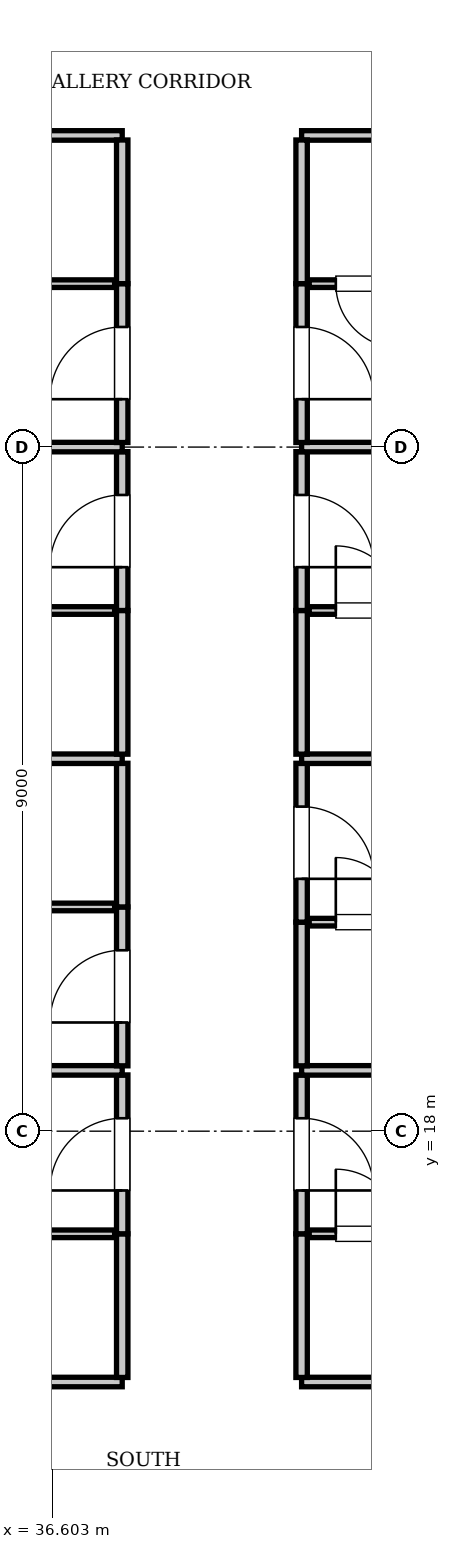
"""IFC4 building model, lengths in metres.
Left out: names, types, materials, properties, quantities, classifications, styles, units other than length and angle.
Written with IfcOpenShell. Run it as: python <this file> out.ifc"""

import sys

from ifc_helpers import new_model, si_unit, direction, frame, frame_2d, origin, place, context, subcontext, project, spatial, rectangle, extrude, element, fill, save


model = new_model("IFC4")
c1 = context("Model", 3, precision=1e-05, world=origin(), true_north=direction((0.0, 1.0)))
c2 = subcontext(c1, "Body", "Model", "MODEL_VIEW")
j1 = project(units=[si_unit("LENGTHUNIT", "METRE"), si_unit("PLANEANGLEUNIT", "RADIAN")], contexts=[c1])
p1 = place(None, origin())
s1 = spatial("IfcSite", under=j1, at=p1, CompositionType="ELEMENT")
p2 = place(p1, origin())
s2 = spatial("IfcBuilding", under=s1, at=p2, CompositionType="ELEMENT")
p3 = place(p2, frame((0.0, 0.0, 177.45)))
s3 = spatial("IfcBuildingStorey", under=s2, at=p3, CompositionType="ELEMENT", Elevation=177.45)
p4 = place(p3, frame((13.2, 14.7, 0.0), z_axis=(0.0, 0.0, 1.0), x_axis=(1.0, 0.0, 0.0)))
e1 = element("IfcWall", 1, at=p4, inside=s3, PredefinedType="PARTITIONING", context=c2, shape_type="SweptSolid", body=[
    extrude(rectangle(XDim=24.32, YDim=0.125, at=frame_2d((12.16, 0.0))), origin(), (0.0, 0.0, 1.0), 3.61),
])
p5 = place(p3, frame((39.88, 14.7, 0.0), z_axis=(0.0, 0.0, 1.0), x_axis=(1.0, 0.0, 0.0)))
e2 = element("IfcWall", 2, at=p5, inside=s3, PredefinedType="PARTITIONING", context=c2, shape_type="SweptSolid", body=[
    extrude(rectangle(XDim=22.52, YDim=0.125, at=frame_2d((11.26, 0.0))), origin(), (0.0, 0.0, 1.0), 3.61),
])
p6 = place(p3, frame((13.2, 31.1, 0.0), z_axis=(0.0, 0.0, 1.0), x_axis=(1.0, 0.0, 0.0)))
e3 = element("IfcWall", 3, at=p6, inside=s3, PredefinedType="PARTITIONING", context=c2, shape_type="SweptSolid", body=[
    extrude(rectangle(XDim=24.32, YDim=0.125, at=frame_2d((12.16, 0.0))), origin(), (0.0, 0.0, 1.0), 3.61),
])
p7 = place(p3, frame((39.88, 31.1, 0.0), z_axis=(0.0, 0.0, 1.0), x_axis=(1.0, 0.0, 0.0)))
e4 = element("IfcWall", 4, at=p7, inside=s3, PredefinedType="PARTITIONING", context=c2, shape_type="SweptSolid", body=[
    extrude(rectangle(XDim=22.52, YDim=0.125, at=frame_2d((11.26, 0.0))), origin(), (0.0, 0.0, 1.0), 3.61),
])
p8 = place(p3, frame((37.52, 14.76, 0.0), z_axis=(0.0, 0.0, 1.0), x_axis=(0.0, 1.0, 0.0)))
e5 = element("IfcWall", 5, at=p8, inside=s3, PredefinedType="PARTITIONING", context=c2, shape_type="SweptSolid", body=[
    extrude(rectangle(XDim=1.89, YDim=0.15, at=frame_2d((0.945, 0.0))), origin(), (0.0, 0.0, 1.0), 3.61),
])
p9 = place(p3, frame((37.52, 16.65, 0.0), z_axis=(0.0, 0.0, 1.0), x_axis=(0.0, 1.0, 0.0)))
e6 = element("IfcWall", 6, at=p9, inside=s3, PredefinedType="PARTITIONING", context=c2, shape_type="SweptSolid", body=[
    extrude(rectangle(XDim=2.09, YDim=0.15, at=frame_2d((1.045, 0.0))), origin(), (0.0, 0.0, 1.0), 3.61),
])
p10 = place(p9, frame((0.57, 0.0, 0.0)))
e7 = element("IfcOpeningElement", 7, at=p10, cuts=e6, PredefinedType="OPENING", context=c2, shape_type="SweptSolid", body=[
    extrude(rectangle(XDim=0.95, YDim=2.15, at=frame_2d((0.475, 1.075))), frame((0.0, 0.085, 0.0), z_axis=(0.0, -1.0, 0.0), x_axis=(1.0, 0.0, 0.0)), (0.0, 0.0, 1.0), 0.17),
])
p11 = place(p3, frame((35.12, 16.65, 0.0), z_axis=(0.0, 0.0, 1.0), x_axis=(1.0, 0.0, 0.0)))
e8 = element("IfcWall", 8, at=p11, inside=s3, PredefinedType="PARTITIONING", context=c2, shape_type="SweptSolid", body=[
    extrude(rectangle(XDim=2.3, YDim=0.1, at=frame_2d((1.15, 0.0))), origin(), (0.0, 0.0, 1.0), 3.61),
])
p12 = place(p11, frame((0.35, 0.0, 0.0)))
e9 = element("IfcOpeningElement", 9, at=p12, cuts=e8, PredefinedType="OPENING", context=c2, shape_type="SweptSolid", body=[
    extrude(rectangle(XDim=0.85, YDim=2.1, at=frame_2d((0.425, 1.05))), frame((0.0, 0.06, 0.0), z_axis=(0.0, -1.0, 0.0), x_axis=(1.0, 0.0, 0.0)), (0.0, 0.0, 1.0), 0.12),
])
p13 = place(p3, frame((39.88, 14.76, 0.0), z_axis=(0.0, 0.0, 1.0), x_axis=(0.0, 1.0, 0.0)))
e10 = element("IfcWall", 10, at=p13, inside=s3, PredefinedType="PARTITIONING", context=c2, shape_type="SweptSolid", body=[
    extrude(rectangle(XDim=1.89, YDim=0.15, at=frame_2d((0.945, 0.0))), origin(), (0.0, 0.0, 1.0), 3.61),
])
p14 = place(p3, frame((39.88, 16.65, 0.0), z_axis=(0.0, 0.0, 1.0), x_axis=(0.0, 1.0, 0.0)))
e11 = element("IfcWall", 11, at=p14, inside=s3, PredefinedType="PARTITIONING", context=c2, shape_type="SweptSolid", body=[
    extrude(rectangle(XDim=2.09, YDim=0.15, at=frame_2d((1.045, 0.0))), origin(), (0.0, 0.0, 1.0), 3.61),
])
p15 = place(p14, frame((0.57, 0.0, 0.0)))
e12 = element("IfcOpeningElement", 12, at=p15, cuts=e11, PredefinedType="OPENING", context=c2, shape_type="SweptSolid", body=[
    extrude(rectangle(XDim=0.95, YDim=2.15, at=frame_2d((0.475, 1.075))), frame((0.0, 0.085, 0.0), z_axis=(0.0, -1.0, 0.0), x_axis=(1.0, 0.0, 0.0)), (0.0, 0.0, 1.0), 0.17),
])
p16 = place(p3, frame((39.98, 16.65, 0.0), z_axis=(0.0, 0.0, 1.0), x_axis=(1.0, 0.0, 0.0)))
e13 = element("IfcWall", 13, at=p16, inside=s3, PredefinedType="PARTITIONING", context=c2, shape_type="SweptSolid", body=[
    extrude(rectangle(XDim=2.3, YDim=0.1, at=frame_2d((1.15, 0.0))), origin(), (0.0, 0.0, 1.0), 3.61),
])
p17 = place(p16, frame((0.35, 0.0, 0.0)))
e14 = element("IfcOpeningElement", 14, at=p17, cuts=e13, PredefinedType="OPENING", context=c2, shape_type="SweptSolid", body=[
    extrude(rectangle(XDim=0.85, YDim=2.1, at=frame_2d((0.425, 1.05))), frame((0.0, 0.06, 0.0), z_axis=(0.0, -1.0, 0.0), x_axis=(1.0, 0.0, 0.0)), (0.0, 0.0, 1.0), 0.12),
])
p18 = place(p3, frame((13.2, 18.8, 0.0), z_axis=(0.0, 0.0, 1.0), x_axis=(1.0, 0.0, 0.0)))
e15 = element("IfcWall", 15, at=p18, inside=s3, PredefinedType="PARTITIONING", context=c2, shape_type="SweptSolid", body=[
    extrude(rectangle(XDim=24.32, YDim=0.125, at=frame_2d((12.16, 0.0))), origin(), (0.0, 0.0, 1.0), 3.61),
])
p19 = place(p3, frame((39.88, 18.8, 0.0), z_axis=(0.0, 0.0, 1.0), x_axis=(1.0, 0.0, 0.0)))
e16 = element("IfcWall", 16, at=p19, inside=s3, PredefinedType="PARTITIONING", context=c2, shape_type="SweptSolid", body=[
    extrude(rectangle(XDim=22.52, YDim=0.125, at=frame_2d((11.26, 0.0))), origin(), (0.0, 0.0, 1.0), 3.61),
])
p20 = place(p3, frame((37.52, 18.86, 0.0), z_axis=(0.0, 0.0, 1.0), x_axis=(0.0, 1.0, 0.0)))
e17 = element("IfcWall", 17, at=p20, inside=s3, PredefinedType="PARTITIONING", context=c2, shape_type="SweptSolid", body=[
    extrude(rectangle(XDim=2.09, YDim=0.15, at=frame_2d((1.045, 0.0))), origin(), (0.0, 0.0, 1.0), 3.61),
])
p21 = place(p20, frame((0.57, 0.0, 0.0)))
e18 = element("IfcOpeningElement", 18, at=p21, cuts=e17, PredefinedType="OPENING", context=c2, shape_type="SweptSolid", body=[
    extrude(rectangle(XDim=0.95, YDim=2.15, at=frame_2d((0.475, 1.075))), frame((0.0, 0.085, 0.0), z_axis=(0.0, -1.0, 0.0), x_axis=(1.0, 0.0, 0.0)), (0.0, 0.0, 1.0), 0.17),
])
p22 = place(p3, frame((37.52, 20.95, 0.0), z_axis=(0.0, 0.0, 1.0), x_axis=(0.0, 1.0, 0.0)))
e19 = element("IfcWall", 19, at=p22, inside=s3, PredefinedType="PARTITIONING", context=c2, shape_type="SweptSolid", body=[
    extrude(rectangle(XDim=1.89, YDim=0.15, at=frame_2d((0.945, 0.0))), origin(), (0.0, 0.0, 1.0), 3.61),
])
p23 = place(p3, frame((35.12, 20.95, 0.0), z_axis=(0.0, 0.0, 1.0), x_axis=(1.0, 0.0, 0.0)))
e20 = element("IfcWall", 20, at=p23, inside=s3, PredefinedType="PARTITIONING", context=c2, shape_type="SweptSolid", body=[
    extrude(rectangle(XDim=2.3, YDim=0.1, at=frame_2d((1.15, 0.0))), origin(), (0.0, 0.0, 1.0), 3.61),
])
p24 = place(p23, frame((0.35, 0.0, 0.0)))
e21 = element("IfcOpeningElement", 21, at=p24, cuts=e20, PredefinedType="OPENING", context=c2, shape_type="SweptSolid", body=[
    extrude(rectangle(XDim=0.85, YDim=2.1, at=frame_2d((0.425, 1.05))), frame((0.0, 0.06, 0.0), z_axis=(0.0, -1.0, 0.0), x_axis=(1.0, 0.0, 0.0)), (0.0, 0.0, 1.0), 0.12),
])
p25 = place(p3, frame((39.88, 18.86, 0.0), z_axis=(0.0, 0.0, 1.0), x_axis=(0.0, 1.0, 0.0)))
e22 = element("IfcWall", 22, at=p25, inside=s3, PredefinedType="PARTITIONING", context=c2, shape_type="SweptSolid", body=[
    extrude(rectangle(XDim=1.89, YDim=0.15, at=frame_2d((0.945, 0.0))), origin(), (0.0, 0.0, 1.0), 3.61),
])
p26 = place(p3, frame((39.88, 20.75, 0.0), z_axis=(0.0, 0.0, 1.0), x_axis=(0.0, 1.0, 0.0)))
e23 = element("IfcWall", 23, at=p26, inside=s3, PredefinedType="PARTITIONING", context=c2, shape_type="SweptSolid", body=[
    extrude(rectangle(XDim=2.09, YDim=0.15, at=frame_2d((1.045, 0.0))), origin(), (0.0, 0.0, 1.0), 3.61),
])
p27 = place(p26, frame((0.57, 0.0, 0.0)))
e24 = element("IfcOpeningElement", 24, at=p27, cuts=e23, PredefinedType="OPENING", context=c2, shape_type="SweptSolid", body=[
    extrude(rectangle(XDim=0.95, YDim=2.15, at=frame_2d((0.475, 1.075))), frame((0.0, 0.085, 0.0), z_axis=(0.0, -1.0, 0.0), x_axis=(1.0, 0.0, 0.0)), (0.0, 0.0, 1.0), 0.17),
])
p28 = place(p3, frame((39.98, 20.75, 0.0), z_axis=(0.0, 0.0, 1.0), x_axis=(1.0, 0.0, 0.0)))
e25 = element("IfcWall", 25, at=p28, inside=s3, PredefinedType="PARTITIONING", context=c2, shape_type="SweptSolid", body=[
    extrude(rectangle(XDim=2.3, YDim=0.1, at=frame_2d((1.15, 0.0))), origin(), (0.0, 0.0, 1.0), 3.61),
])
p29 = place(p28, frame((0.35, 0.0, 0.0)))
e26 = element("IfcOpeningElement", 26, at=p29, cuts=e25, PredefinedType="OPENING", context=c2, shape_type="SweptSolid", body=[
    extrude(rectangle(XDim=0.85, YDim=2.1, at=frame_2d((0.425, 1.05))), frame((0.0, 0.06, 0.0), z_axis=(0.0, -1.0, 0.0), x_axis=(1.0, 0.0, 0.0)), (0.0, 0.0, 1.0), 0.12),
])
p30 = place(p3, frame((13.2, 22.9, 0.0), z_axis=(0.0, 0.0, 1.0), x_axis=(1.0, 0.0, 0.0)))
e27 = element("IfcWall", 27, at=p30, inside=s3, PredefinedType="PARTITIONING", context=c2, shape_type="SweptSolid", body=[
    extrude(rectangle(XDim=24.32, YDim=0.125, at=frame_2d((12.16, 0.0))), origin(), (0.0, 0.0, 1.0), 3.61),
])
p31 = place(p3, frame((39.88, 22.9, 0.0), z_axis=(0.0, 0.0, 1.0), x_axis=(1.0, 0.0, 0.0)))
e28 = element("IfcWall", 28, at=p31, inside=s3, PredefinedType="PARTITIONING", context=c2, shape_type="SweptSolid", body=[
    extrude(rectangle(XDim=22.52, YDim=0.125, at=frame_2d((11.26, 0.0))), origin(), (0.0, 0.0, 1.0), 3.61),
])
p32 = place(p3, frame((37.52, 22.96, 0.0), z_axis=(0.0, 0.0, 1.0), x_axis=(0.0, 1.0, 0.0)))
e29 = element("IfcWall", 29, at=p32, inside=s3, PredefinedType="PARTITIONING", context=c2, shape_type="SweptSolid", body=[
    extrude(rectangle(XDim=1.89, YDim=0.15, at=frame_2d((0.945, 0.0))), origin(), (0.0, 0.0, 1.0), 3.61),
])
p33 = place(p3, frame((37.52, 24.85, 0.0), z_axis=(0.0, 0.0, 1.0), x_axis=(0.0, 1.0, 0.0)))
e30 = element("IfcWall", 30, at=p33, inside=s3, PredefinedType="PARTITIONING", context=c2, shape_type="SweptSolid", body=[
    extrude(rectangle(XDim=2.09, YDim=0.15, at=frame_2d((1.045, 0.0))), origin(), (0.0, 0.0, 1.0), 3.61),
])
p34 = place(p33, frame((0.57, 0.0, 0.0)))
e31 = element("IfcOpeningElement", 31, at=p34, cuts=e30, PredefinedType="OPENING", context=c2, shape_type="SweptSolid", body=[
    extrude(rectangle(XDim=0.95, YDim=2.15, at=frame_2d((0.475, 1.075))), frame((0.0, 0.085, 0.0), z_axis=(0.0, -1.0, 0.0), x_axis=(1.0, 0.0, 0.0)), (0.0, 0.0, 1.0), 0.17),
])
p35 = place(p3, frame((35.12, 24.85, 0.0), z_axis=(0.0, 0.0, 1.0), x_axis=(1.0, 0.0, 0.0)))
e32 = element("IfcWall", 32, at=p35, inside=s3, PredefinedType="PARTITIONING", context=c2, shape_type="SweptSolid", body=[
    extrude(rectangle(XDim=2.3, YDim=0.1, at=frame_2d((1.15, 0.0))), origin(), (0.0, 0.0, 1.0), 3.61),
])
p36 = place(p35, frame((0.35, 0.0, 0.0)))
e33 = element("IfcOpeningElement", 33, at=p36, cuts=e32, PredefinedType="OPENING", context=c2, shape_type="SweptSolid", body=[
    extrude(rectangle(XDim=0.85, YDim=2.1, at=frame_2d((0.425, 1.05))), frame((0.0, 0.06, 0.0), z_axis=(0.0, -1.0, 0.0), x_axis=(1.0, 0.0, 0.0)), (0.0, 0.0, 1.0), 0.12),
])
p37 = place(p3, frame((39.88, 22.96, 0.0), z_axis=(0.0, 0.0, 1.0), x_axis=(0.0, 1.0, 0.0)))
e34 = element("IfcWall", 34, at=p37, inside=s3, PredefinedType="PARTITIONING", context=c2, shape_type="SweptSolid", body=[
    extrude(rectangle(XDim=1.89, YDim=0.15, at=frame_2d((0.945, 0.0))), origin(), (0.0, 0.0, 1.0), 3.61),
])
p38 = place(p3, frame((39.88, 24.85, 0.0), z_axis=(0.0, 0.0, 1.0), x_axis=(0.0, 1.0, 0.0)))
e35 = element("IfcWall", 35, at=p38, inside=s3, PredefinedType="PARTITIONING", context=c2, shape_type="SweptSolid", body=[
    extrude(rectangle(XDim=2.09, YDim=0.15, at=frame_2d((1.045, 0.0))), origin(), (0.0, 0.0, 1.0), 3.61),
])
p39 = place(p38, frame((0.57, 0.0, 0.0)))
e36 = element("IfcOpeningElement", 36, at=p39, cuts=e35, PredefinedType="OPENING", context=c2, shape_type="SweptSolid", body=[
    extrude(rectangle(XDim=0.95, YDim=2.15, at=frame_2d((0.475, 1.075))), frame((0.0, 0.085, 0.0), z_axis=(0.0, -1.0, 0.0), x_axis=(1.0, 0.0, 0.0)), (0.0, 0.0, 1.0), 0.17),
])
p40 = place(p3, frame((39.98, 24.85, 0.0), z_axis=(0.0, 0.0, 1.0), x_axis=(1.0, 0.0, 0.0)))
e37 = element("IfcWall", 37, at=p40, inside=s3, PredefinedType="PARTITIONING", context=c2, shape_type="SweptSolid", body=[
    extrude(rectangle(XDim=2.3, YDim=0.1, at=frame_2d((1.15, 0.0))), origin(), (0.0, 0.0, 1.0), 3.61),
])
p41 = place(p40, frame((0.35, 0.0, 0.0)))
e38 = element("IfcOpeningElement", 38, at=p41, cuts=e37, PredefinedType="OPENING", context=c2, shape_type="SweptSolid", body=[
    extrude(rectangle(XDim=0.85, YDim=2.1, at=frame_2d((0.425, 1.05))), frame((0.0, 0.06, 0.0), z_axis=(0.0, -1.0, 0.0), x_axis=(1.0, 0.0, 0.0)), (0.0, 0.0, 1.0), 0.12),
])
p42 = place(p3, frame((13.2, 27.0, 0.0), z_axis=(0.0, 0.0, 1.0), x_axis=(1.0, 0.0, 0.0)))
e39 = element("IfcWall", 39, at=p42, inside=s3, PredefinedType="PARTITIONING", context=c2, shape_type="SweptSolid", body=[
    extrude(rectangle(XDim=24.32, YDim=0.125, at=frame_2d((12.16, 0.0))), origin(), (0.0, 0.0, 1.0), 2.41),
])
p43 = place(p3, frame((39.88, 27.0, 0.0), z_axis=(0.0, 0.0, 1.0), x_axis=(1.0, 0.0, 0.0)))
e40 = element("IfcWall", 40, at=p43, inside=s3, PredefinedType="PARTITIONING", context=c2, shape_type="SweptSolid", body=[
    extrude(rectangle(XDim=22.52, YDim=0.125, at=frame_2d((11.26, 0.0))), origin(), (0.0, 0.0, 1.0), 2.41),
])
p44 = place(p3, frame((37.52, 27.06, 0.0), z_axis=(0.0, 0.0, 1.0), x_axis=(0.0, 1.0, 0.0)))
e41 = element("IfcWall", 41, at=p44, inside=s3, PredefinedType="PARTITIONING", context=c2, shape_type="SweptSolid", body=[
    extrude(rectangle(XDim=2.09, YDim=0.15, at=frame_2d((1.045, 0.0))), origin(), (0.0, 0.0, 1.0), 3.61),
])
p45 = place(p44, frame((0.57, 0.0, 0.0)))
e42 = element("IfcOpeningElement", 42, at=p45, cuts=e41, PredefinedType="OPENING", context=c2, shape_type="SweptSolid", body=[
    extrude(rectangle(XDim=0.95, YDim=2.15, at=frame_2d((0.475, 1.075))), frame((0.0, 0.085, 0.0), z_axis=(0.0, -1.0, 0.0), x_axis=(1.0, 0.0, 0.0)), (0.0, 0.0, 1.0), 0.17),
])
p46 = place(p3, frame((37.52, 29.15, 0.0), z_axis=(0.0, 0.0, 1.0), x_axis=(0.0, 1.0, 0.0)))
e43 = element("IfcWall", 43, at=p46, inside=s3, PredefinedType="PARTITIONING", context=c2, shape_type="SweptSolid", body=[
    extrude(rectangle(XDim=1.89, YDim=0.15, at=frame_2d((0.945, 0.0))), origin(), (0.0, 0.0, 1.0), 3.61),
])
p47 = place(p3, frame((35.12, 29.15, 0.0), z_axis=(0.0, 0.0, 1.0), x_axis=(1.0, 0.0, 0.0)))
e44 = element("IfcWall", 44, at=p47, inside=s3, PredefinedType="PARTITIONING", context=c2, shape_type="SweptSolid", body=[
    extrude(rectangle(XDim=2.3, YDim=0.1, at=frame_2d((1.15, 0.0))), origin(), (0.0, 0.0, 1.0), 3.61),
])
p48 = place(p47, frame((0.35, 0.0, 0.0)))
e45 = element("IfcOpeningElement", 45, at=p48, cuts=e44, PredefinedType="OPENING", context=c2, shape_type="SweptSolid", body=[
    extrude(rectangle(XDim=0.85, YDim=2.1, at=frame_2d((0.425, 1.05))), frame((0.0, 0.06, 0.0), z_axis=(0.0, -1.0, 0.0), x_axis=(1.0, 0.0, 0.0)), (0.0, 0.0, 1.0), 0.12),
])
p49 = place(p3, frame((39.88, 27.06, 0.0), z_axis=(0.0, 0.0, 1.0), x_axis=(0.0, 1.0, 0.0)))
e46 = element("IfcWall", 46, at=p49, inside=s3, PredefinedType="PARTITIONING", context=c2, shape_type="SweptSolid", body=[
    extrude(rectangle(XDim=2.09, YDim=0.15, at=frame_2d((1.045, 0.0))), origin(), (0.0, 0.0, 1.0), 3.61),
])
p50 = place(p49, frame((0.57, 0.0, 0.0)))
e47 = element("IfcOpeningElement", 47, at=p50, cuts=e46, PredefinedType="OPENING", context=c2, shape_type="SweptSolid", body=[
    extrude(rectangle(XDim=0.95, YDim=2.15, at=frame_2d((0.475, 1.075))), frame((0.0, 0.085, 0.0), z_axis=(0.0, -1.0, 0.0), x_axis=(1.0, 0.0, 0.0)), (0.0, 0.0, 1.0), 0.17),
])
p51 = place(p3, frame((39.88, 29.15, 0.0), z_axis=(0.0, 0.0, 1.0), x_axis=(0.0, 1.0, 0.0)))
e48 = element("IfcWall", 48, at=p51, inside=s3, PredefinedType="PARTITIONING", context=c2, shape_type="SweptSolid", body=[
    extrude(rectangle(XDim=1.89, YDim=0.15, at=frame_2d((0.945, 0.0))), origin(), (0.0, 0.0, 1.0), 3.61),
])
p52 = place(p3, frame((39.98, 29.15, 0.0), z_axis=(0.0, 0.0, 1.0), x_axis=(1.0, 0.0, 0.0)))
e49 = element("IfcWall", 49, at=p52, inside=s3, PredefinedType="PARTITIONING", context=c2, shape_type="SweptSolid", body=[
    extrude(rectangle(XDim=2.3, YDim=0.1, at=frame_2d((1.15, 0.0))), origin(), (0.0, 0.0, 1.0), 3.61),
])
p53 = place(p52, frame((0.35, 0.0, 0.0)))
e50 = element("IfcOpeningElement", 50, at=p53, cuts=e49, PredefinedType="OPENING", context=c2, shape_type="SweptSolid", body=[
    extrude(rectangle(XDim=0.85, YDim=2.1, at=frame_2d((0.425, 1.05))), frame((0.0, 0.06, 0.0), z_axis=(0.0, -1.0, 0.0), x_axis=(1.0, 0.0, 0.0)), (0.0, 0.0, 1.0), 0.12),
])
p54 = place(p10, origin())
e51 = element("IfcDoor", 51, at=p54, inside=s3, OperationType="SINGLE_SWING_LEFT", PredefinedType="DOOR", context=c2, shape_type="SweptSolid", body=[
    extrude(rectangle(XDim=0.95, YDim=2.15, at=frame_2d((0.475, 1.075))), frame((0.0, 0.025, 0.0), z_axis=(0.0, -1.0, 0.0), x_axis=(1.0, 0.0, 0.0)), (0.0, 0.0, 1.0), 0.05),
])
fill(e7, e51)
p55 = place(p17, origin())
e52 = element("IfcDoor", 52, at=p55, inside=s3, OperationType="SINGLE_SWING_LEFT", PredefinedType="DOOR", context=c2, shape_type="SweptSolid", body=[
    extrude(rectangle(XDim=0.85, YDim=2.1, at=frame_2d((0.425, 1.05))), frame((0.0, 0.025, 0.0), z_axis=(0.0, -1.0, 0.0), x_axis=(1.0, 0.0, 0.0)), (0.0, 0.0, 1.0), 0.05),
])
fill(e14, e52)
p56 = place(p15, frame((0.95, 0.0, 0.0), z_axis=(0.0, 0.0, 1.0), x_axis=(-1.0, 0.0, 0.0)))
e53 = element("IfcDoor", 53, at=p56, inside=s3, OperationType="SINGLE_SWING_RIGHT", PredefinedType="DOOR", context=c2, shape_type="SweptSolid", body=[
    extrude(rectangle(XDim=0.95, YDim=2.15, at=frame_2d((0.475, 1.075))), frame((0.0, 0.025, 0.0), z_axis=(0.0, -1.0, 0.0), x_axis=(1.0, 0.0, 0.0)), (0.0, 0.0, 1.0), 0.05),
])
fill(e12, e53)
p57 = place(p21, origin())
e54 = element("IfcDoor", 54, at=p57, inside=s3, OperationType="SINGLE_SWING_LEFT", PredefinedType="DOOR", context=c2, shape_type="SweptSolid", body=[
    extrude(rectangle(XDim=0.95, YDim=2.15, at=frame_2d((0.475, 1.075))), frame((0.0, 0.025, 0.0), z_axis=(0.0, -1.0, 0.0), x_axis=(1.0, 0.0, 0.0)), (0.0, 0.0, 1.0), 0.05),
])
fill(e18, e54)
p58 = place(p29, origin())
e55 = element("IfcDoor", 55, at=p58, inside=s3, OperationType="SINGLE_SWING_LEFT", PredefinedType="DOOR", context=c2, shape_type="SweptSolid", body=[
    extrude(rectangle(XDim=0.85, YDim=2.1, at=frame_2d((0.425, 1.05))), frame((0.0, 0.025, 0.0), z_axis=(0.0, -1.0, 0.0), x_axis=(1.0, 0.0, 0.0)), (0.0, 0.0, 1.0), 0.05),
])
fill(e26, e55)
p59 = place(p27, frame((0.95, 0.0, 0.0), z_axis=(0.0, 0.0, 1.0), x_axis=(-1.0, 0.0, 0.0)))
e56 = element("IfcDoor", 56, at=p59, inside=s3, OperationType="SINGLE_SWING_RIGHT", PredefinedType="DOOR", context=c2, shape_type="SweptSolid", body=[
    extrude(rectangle(XDim=0.95, YDim=2.15, at=frame_2d((0.475, 1.075))), frame((0.0, 0.025, 0.0), z_axis=(0.0, -1.0, 0.0), x_axis=(1.0, 0.0, 0.0)), (0.0, 0.0, 1.0), 0.05),
])
fill(e24, e56)
p60 = place(p34, origin())
e57 = element("IfcDoor", 57, at=p60, inside=s3, OperationType="SINGLE_SWING_LEFT", PredefinedType="DOOR", context=c2, shape_type="SweptSolid", body=[
    extrude(rectangle(XDim=0.95, YDim=2.15, at=frame_2d((0.475, 1.075))), frame((0.0, 0.025, 0.0), z_axis=(0.0, -1.0, 0.0), x_axis=(1.0, 0.0, 0.0)), (0.0, 0.0, 1.0), 0.05),
])
fill(e31, e57)
p61 = place(p41, origin())
e58 = element("IfcDoor", 58, at=p61, inside=s3, OperationType="SINGLE_SWING_LEFT", PredefinedType="DOOR", context=c2, shape_type="SweptSolid", body=[
    extrude(rectangle(XDim=0.85, YDim=2.1, at=frame_2d((0.425, 1.05))), frame((0.0, 0.025, 0.0), z_axis=(0.0, -1.0, 0.0), x_axis=(1.0, 0.0, 0.0)), (0.0, 0.0, 1.0), 0.05),
])
fill(e38, e58)
p62 = place(p39, frame((0.95, 0.0, 0.0), z_axis=(0.0, 0.0, 1.0), x_axis=(-1.0, 0.0, 0.0)))
e59 = element("IfcDoor", 59, at=p62, inside=s3, OperationType="SINGLE_SWING_RIGHT", PredefinedType="DOOR", context=c2, shape_type="SweptSolid", body=[
    extrude(rectangle(XDim=0.95, YDim=2.15, at=frame_2d((0.475, 1.075))), frame((0.0, 0.025, 0.0), z_axis=(0.0, -1.0, 0.0), x_axis=(1.0, 0.0, 0.0)), (0.0, 0.0, 1.0), 0.05),
])
fill(e36, e59)
p63 = place(p45, origin())
e60 = element("IfcDoor", 60, at=p63, inside=s3, OperationType="SINGLE_SWING_LEFT", PredefinedType="DOOR", context=c2, shape_type="SweptSolid", body=[
    extrude(rectangle(XDim=0.95, YDim=2.15, at=frame_2d((0.475, 1.075))), frame((0.0, 0.025, 0.0), z_axis=(0.0, -1.0, 0.0), x_axis=(1.0, 0.0, 0.0)), (0.0, 0.0, 1.0), 0.05),
])
fill(e42, e60)
p64 = place(p53, frame((0.85, 0.0, 0.0), z_axis=(0.0, 0.0, 1.0), x_axis=(-1.0, 0.0, 0.0)))
e61 = element("IfcDoor", 61, at=p64, inside=s3, OperationType="SINGLE_SWING_LEFT", PredefinedType="DOOR", context=c2, shape_type="SweptSolid", body=[
    extrude(rectangle(XDim=0.85, YDim=2.1, at=frame_2d((0.425, 1.05))), frame((0.0, 0.025, 0.0), z_axis=(0.0, -1.0, 0.0), x_axis=(1.0, 0.0, 0.0)), (0.0, 0.0, 1.0), 0.05),
])
fill(e50, e61)
p65 = place(p50, frame((0.95, 0.0, 0.0), z_axis=(0.0, 0.0, 1.0), x_axis=(-1.0, 0.0, 0.0)))
e62 = element("IfcDoor", 62, at=p65, inside=s3, OperationType="SINGLE_SWING_RIGHT", PredefinedType="DOOR", context=c2, shape_type="SweptSolid", body=[
    extrude(rectangle(XDim=0.95, YDim=2.15, at=frame_2d((0.475, 1.075))), frame((0.0, 0.025, 0.0), z_axis=(0.0, -1.0, 0.0), x_axis=(1.0, 0.0, 0.0)), (0.0, 0.0, 1.0), 0.05),
])
fill(e47, e62)
save(model, sys.argv[1])
